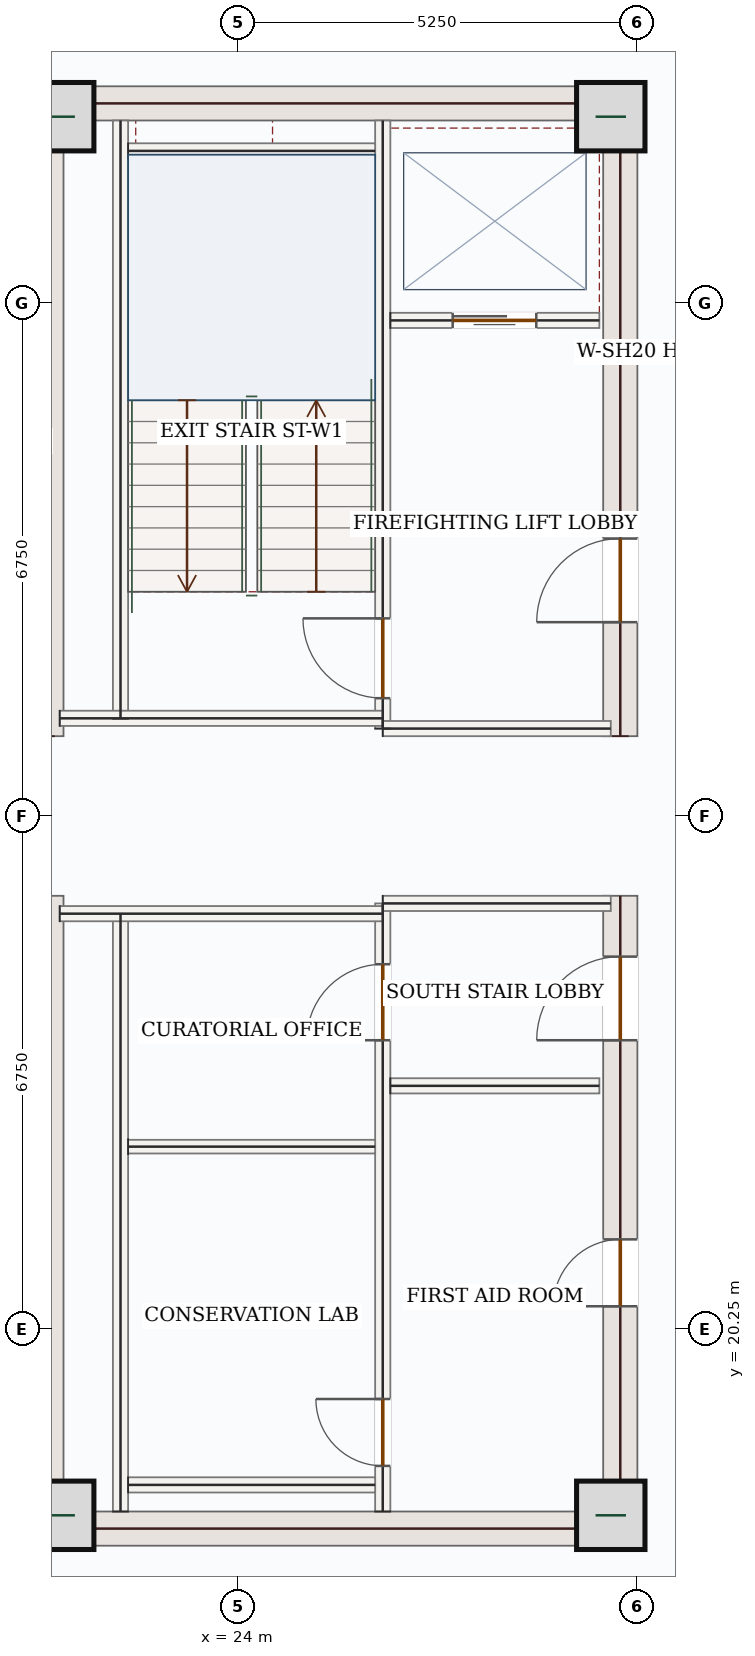
"""IFC4 building model, lengths in metres.
Left out: names, types, materials, properties, quantities, classifications, styles, units other than length and angle.
Written with IfcOpenShell. Run it as: python <this file> out.ifc"""

import sys

from ifc_helpers import new_model, si_unit, direction, frame, frame_2d, origin, origin_2d, place, context, subcontext, project, spatial, rectangle, extrude, source, transform, mapped, element, fill, save


model = new_model("IFC4")
c1 = context("Model", 3, precision=1e-05, world=origin(), true_north=direction((0.0, 1.0)))
c2 = subcontext(c1, "Body", "Model", "MODEL_VIEW")
j1 = project(units=[si_unit("LENGTHUNIT", "METRE"), si_unit("PLANEANGLEUNIT", "RADIAN")], contexts=[c1])
p1 = place(None, origin())
s1 = spatial("IfcSite", under=j1, at=p1, CompositionType="ELEMENT")
p2 = place(p1, origin())
s2 = spatial("IfcBuilding", under=s1, at=p2, CompositionType="ELEMENT")
p3 = place(p2, frame((0.0, 0.0, 357.3)))
s3 = spatial("IfcBuildingStorey", under=s2, at=p3, CompositionType="ELEMENT", Elevation=357.3)
m1 = source(origin(), c2, "Body", "SweptSolid", [
    extrude(rectangle(XDim=8.55, YDim=0.45, at=frame_2d((4.275, 0.0))), origin(), (0.0, 0.0, 1.0), 3.45),
])
for number, where, z_axis, x_axis in (
    (1, (21.475, 17.4, 0.0), (0.0, 0.0, 1.0), (0.0, 1.0, 0.0)),
    (2, (21.475, 28.05, 0.0), (0.0, 0.0, 1.0), (0.0, 1.0, 0.0)),
):
    element("IfcWall", number, at=place(p3, frame(where, z_axis=z_axis, x_axis=x_axis)), inside=s3, PredefinedType="SHEAR", context=c2, shape_type="MappedRepresentation", body=[
        mapped(m1, transform((0.0, 0.0, 0.0), x_axis=(1.0, 0.0, 0.0), y_axis=(0.0, 1.0, 0.0), z_axis=(0.0, 0.0, 1.0), scale=1.0)),
    ])
p4 = place(p3, frame((29.025, 17.4, 0.0), z_axis=(0.0, 0.0, 1.0), x_axis=(0.0, 1.0, 0.0)))
e3 = element("IfcWall", 3, at=p4, inside=s3, PredefinedType="SHEAR", context=c2, shape_type="SweptSolid", body=[
    extrude(rectangle(XDim=8.55, YDim=0.45, at=frame_2d((4.275, 0.0))), origin(), (0.0, 0.0, 1.0), 3.45),
])
p5 = place(p4, frame((6.65, 0.0, 0.0)))
e4 = element("IfcOpeningElement", 4, at=p5, cuts=e3, PredefinedType="OPENING", context=c2, shape_type="SweptSolid", body=[
    extrude(rectangle(XDim=1.1, YDim=2.2, at=frame_2d((0.55, 1.1))), frame((0.0, 0.235, 0.0), z_axis=(0.0, -1.0, 0.0), x_axis=(1.0, 0.0, 0.0)), (0.0, 0.0, 1.0), 0.47),
])
p6 = place(p4, frame((3.15, 0.0, 0.0)))
e5 = element("IfcOpeningElement", 5, at=p6, cuts=e3, PredefinedType="OPENING", context=c2, shape_type="SweptSolid", body=[
    extrude(rectangle(XDim=0.88, YDim=2.1, at=frame_2d((0.44, 1.05))), frame((0.0, 0.235, 0.0), z_axis=(0.0, -1.0, 0.0), x_axis=(1.0, 0.0, 0.0)), (0.0, 0.0, 1.0), 0.47),
])
p7 = place(p3, frame((29.025, 28.05, 0.0), z_axis=(0.0, 0.0, 1.0), x_axis=(0.0, 1.0, 0.0)))
e6 = element("IfcWall", 6, at=p7, inside=s3, PredefinedType="SHEAR", context=c2, shape_type="SweptSolid", body=[
    extrude(rectangle(XDim=8.55, YDim=0.45, at=frame_2d((4.275, 0.0))), origin(), (0.0, 0.0, 1.0), 3.45),
])
p8 = place(p7, frame((1.5, 0.0, 0.0)))
e7 = element("IfcOpeningElement", 7, at=p8, cuts=e6, PredefinedType="OPENING", context=c2, shape_type="SweptSolid", body=[
    extrude(rectangle(XDim=1.1, YDim=2.2, at=frame_2d((0.55, 1.1))), frame((0.0, 0.235, 0.0), z_axis=(0.0, -1.0, 0.0), x_axis=(1.0, 0.0, 0.0)), (0.0, 0.0, 1.0), 0.47),
])
m2 = source(origin(), c2, "Body", "SweptSolid", [
    extrude(rectangle(XDim=7.1, YDim=0.45, at=frame_2d((3.55, 0.0))), origin(), (0.0, 0.0, 1.0), 3.45),
])
for number, where, z_axis, x_axis in (
    (8, (21.7, 17.625, 0.0), (0.0, 0.0, 1.0), (1.0, 0.0, 0.0)),
    (9, (21.7, 36.375, 0.0), (0.0, 0.0, 1.0), (1.0, 0.0, 0.0)),
):
    element("IfcWall", number, at=place(p3, frame(where, z_axis=z_axis, x_axis=x_axis)), inside=s3, PredefinedType="SHEAR", context=c2, shape_type="MappedRepresentation", body=[
        mapped(m2, transform((0.0, 0.0, 0.0), x_axis=(1.0, 0.0, 0.0), y_axis=(0.0, 1.0, 0.0), z_axis=(0.0, 0.0, 1.0), scale=1.0)),
    ])
m3 = source(origin(), c2, "Body", "SweptSolid", [
    extrude(rectangle(XDim=0.9, YDim=0.9, at=origin_2d()), origin(), (0.0, 0.0, 1.0), 3.75),
])
for number, where, z_axis, x_axis in (
    (10, (21.65, 17.8, 0.0), (0.0, 0.0, 1.0), (1.0, 0.0, 0.0)),
    (11, (28.9, 17.8, 0.0), (0.0, 0.0, 1.0), (1.0, 0.0, 0.0)),
    (12, (21.65, 36.2, 0.0), (0.0, 0.0, 1.0), (1.0, 0.0, 0.0)),
    (13, (28.9, 36.2, 0.0), (0.0, 0.0, 1.0), (1.0, 0.0, 0.0)),
):
    element("IfcColumn", number, at=place(p3, frame(where, z_axis=z_axis, x_axis=x_axis)), inside=s3, PredefinedType="COLUMN", context=c2, shape_type="MappedRepresentation", body=[
        mapped(m3, transform((0.0, 0.0, 0.0), x_axis=(1.0, 0.0, 0.0), y_axis=(0.0, 1.0, 0.0), z_axis=(0.0, 0.0, 1.0), scale=1.0)),
    ])
p9 = place(p3, frame((23.005, 14.093, 0.0), z_axis=(0.0, 0.0, 1.0), x_axis=(-0.681486568047, 0.731830620821, 0.0)))
e14 = element("IfcWall", 14, at=p9, inside=s3, PredefinedType="SOLIDWALL", context=c2, shape_type="SweptSolid", body=[
    extrude(rectangle(XDim=5.965, YDim=0.28, at=frame_2d((2.982, 0.0))), origin(), (0.0, 0.0, 1.0), 3.45),
])
p10 = place(p9, frame((2.232, 0.0, 0.85)))
e15 = element("IfcOpeningElement", 15, at=p10, cuts=e14, PredefinedType="OPENING", context=c2, shape_type="SweptSolid", body=[
    extrude(rectangle(XDim=1.5, YDim=1.5, at=frame_2d((0.75, 0.75))), frame((0.0, 0.15, 0.0), z_axis=(0.0, -1.0, 0.0), x_axis=(1.0, 0.0, 0.0)), (0.0, 0.0, 1.0), 0.3),
])
m4 = source(origin(), c2, "Body", "SweptSolid", [
    extrude(rectangle(XDim=7.87, YDim=0.2, at=frame_2d((3.935, 0.0))), origin(), (0.0, 0.0, 1.0), 3.45),
])
for number, where, z_axis, x_axis in (
    (16, (22.45, 17.85, 0.0), (0.0, 0.0, 1.0), (0.0, 1.0, 0.0)),
    (17, (22.45, 28.28, 0.0), (0.0, 0.0, 1.0), (0.0, 1.0, 0.0)),
):
    element("IfcWall", number, at=place(p3, frame(where, z_axis=z_axis, x_axis=x_axis)), inside=s3, PredefinedType="SOLIDWALL", context=c2, shape_type="MappedRepresentation", body=[
        mapped(m4, transform((0.0, 0.0, 0.0), x_axis=(1.0, 0.0, 0.0), y_axis=(0.0, 1.0, 0.0), z_axis=(0.0, 0.0, 1.0), scale=1.0)),
    ])
p11 = place(p3, frame((25.9, 17.85, 0.0), z_axis=(0.0, 0.0, 1.0), x_axis=(0.0, 1.0, 0.0)))
e18 = element("IfcWall", 18, at=p11, inside=s3, PredefinedType="SOLIDWALL", context=c2, shape_type="SweptSolid", body=[
    extrude(rectangle(XDim=8.0, YDim=0.2, at=frame_2d((4.0, 0.0))), origin(), (0.0, 0.0, 1.0), 3.45),
])
p12 = place(p11, frame((6.2, 0.0, 0.0)))
e19 = element("IfcOpeningElement", 19, at=p12, cuts=e18, PredefinedType="OPENING", context=c2, shape_type="SweptSolid", body=[
    extrude(rectangle(XDim=1.0, YDim=2.15, at=frame_2d((0.5, 1.075))), frame((0.0, 0.11, 0.0), z_axis=(0.0, -1.0, 0.0), x_axis=(1.0, 0.0, 0.0)), (0.0, 0.0, 1.0), 0.22),
])
p13 = place(p11, frame((0.6, 0.0, 0.0)))
e20 = element("IfcOpeningElement", 20, at=p13, cuts=e18, PredefinedType="OPENING", context=c2, shape_type="SweptSolid", body=[
    extrude(rectangle(XDim=0.88, YDim=2.1, at=frame_2d((0.44, 1.05))), frame((0.0, 0.11, 0.0), z_axis=(0.0, -1.0, 0.0), x_axis=(1.0, 0.0, 0.0)), (0.0, 0.0, 1.0), 0.22),
])
p14 = place(p3, frame((25.9, 28.15, 0.0), z_axis=(0.0, 0.0, 1.0), x_axis=(0.0, 1.0, 0.0)))
e21 = element("IfcWall", 21, at=p14, inside=s3, PredefinedType="SOLIDWALL", context=c2, shape_type="SweptSolid", body=[
    extrude(rectangle(XDim=8.0, YDim=0.2, at=frame_2d((4.0, 0.0))), origin(), (0.0, 0.0, 1.0), 3.45),
])
p15 = place(p14, frame((0.4, 0.0, 0.0)))
e22 = element("IfcOpeningElement", 22, at=p15, cuts=e21, PredefinedType="OPENING", context=c2, shape_type="SweptSolid", body=[
    extrude(rectangle(XDim=1.05, YDim=2.15, at=frame_2d((0.525, 1.075))), frame((0.0, 0.11, 0.0), z_axis=(0.0, -1.0, 0.0), x_axis=(1.0, 0.0, 0.0)), (0.0, 0.0, 1.0), 0.22),
])
m5 = source(origin(), c2, "Body", "SweptSolid", [
    extrude(rectangle(XDim=4.25, YDim=0.2, at=frame_2d((2.125, 0.0))), origin(), (0.0, 0.0, 1.0), 3.45),
])
p16 = place(p3, frame((21.65, 25.715, 0.0), z_axis=(0.0, 0.0, 1.0), x_axis=(1.0, 0.0, 0.0)))
e23 = element("IfcWall", 23, at=p16, inside=s3, PredefinedType="SOLIDWALL", context=c2, shape_type="MappedRepresentation", body=[
    mapped(m5, transform((0.0, 0.0, 0.0), x_axis=(1.0, 0.0, 0.0), y_axis=(0.0, 1.0, 0.0), z_axis=(0.0, 0.0, 1.0), scale=1.0)),
])
m6 = source(origin(), c2, "Body", "SweptSolid", [
    extrude(rectangle(XDim=3.0, YDim=0.2, at=frame_2d((1.5, 0.0))), origin(), (0.0, 0.0, 1.0), 3.45),
])
p17 = place(p3, frame((25.9, 25.85, 0.0), z_axis=(0.0, 0.0, 1.0), x_axis=(1.0, 0.0, 0.0)))
e24 = element("IfcWall", 24, at=p17, inside=s3, PredefinedType="SOLIDWALL", context=c2, shape_type="MappedRepresentation", body=[
    mapped(m6, transform((0.0, 0.0, 0.0), x_axis=(1.0, 0.0, 0.0), y_axis=(0.0, 1.0, 0.0), z_axis=(0.0, 0.0, 1.0), scale=1.0)),
])
p18 = place(p3, frame((21.65, 28.285, 0.0), z_axis=(0.0, 0.0, 1.0), x_axis=(1.0, 0.0, 0.0)))
e25 = element("IfcWall", 25, at=p18, inside=s3, PredefinedType="SOLIDWALL", context=c2, shape_type="MappedRepresentation", body=[
    mapped(m5, transform((0.0, 0.0, 0.0), x_axis=(1.0, 0.0, 0.0), y_axis=(0.0, 1.0, 0.0), z_axis=(0.0, 0.0, 1.0), scale=1.0)),
])
p19 = place(p3, frame((25.9, 28.15, 0.0), z_axis=(0.0, 0.0, 1.0), x_axis=(1.0, 0.0, 0.0)))
e26 = element("IfcWall", 26, at=p19, inside=s3, PredefinedType="SOLIDWALL", context=c2, shape_type="MappedRepresentation", body=[
    mapped(m6, transform((0.0, 0.0, 0.0), x_axis=(1.0, 0.0, 0.0), y_axis=(0.0, 1.0, 0.0), z_axis=(0.0, 0.0, 1.0), scale=1.0)),
])
m7 = source(origin(), c2, "Body", "SweptSolid", [
    extrude(rectangle(XDim=3.25, YDim=0.2, at=frame_2d((1.625, 0.0))), origin(), (0.0, 0.0, 1.0), 3.45),
])
for number, where, z_axis, x_axis in (
    (27, (22.55, 35.75, 0.0), (0.0, 0.0, 1.0), (1.0, 0.0, 0.0)),
    (28, (22.55, 18.2, 0.0), (0.0, 0.0, 1.0), (1.0, 0.0, 0.0)),
):
    element("IfcWall", number, at=place(p3, frame(where, z_axis=z_axis, x_axis=x_axis)), inside=s3, PredefinedType="SOLIDWALL", context=c2, shape_type="MappedRepresentation", body=[
        mapped(m7, transform((0.0, 0.0, 0.0), x_axis=(1.0, 0.0, 0.0), y_axis=(0.0, 1.0, 0.0), z_axis=(0.0, 0.0, 1.0), scale=1.0)),
    ])
m8 = source(origin(), c2, "Body", "SweptSolid", [
    extrude(rectangle(XDim=3.25, YDim=0.18, at=frame_2d((1.625, 0.0))), origin(), (0.0, 0.0, 1.0), 3.45),
])
p20 = place(p3, frame((22.55, 22.65, 0.0), z_axis=(0.0, 0.0, 1.0), x_axis=(1.0, 0.0, 0.0)))
e29 = element("IfcWall", 29, at=p20, inside=s3, PredefinedType="PARTITIONING", context=c2, shape_type="MappedRepresentation", body=[
    mapped(m8, transform((0.0, 0.0, 0.0), x_axis=(1.0, 0.0, 0.0), y_axis=(0.0, 1.0, 0.0), z_axis=(0.0, 0.0, 1.0), scale=1.0)),
])
p21 = place(p3, frame((26.0, 33.52, 0.0), z_axis=(0.0, 0.0, 1.0), x_axis=(1.0, 0.0, 0.0)))
e30 = element("IfcWall", 30, at=p21, inside=s3, PredefinedType="SOLIDWALL", context=c2, shape_type="SweptSolid", body=[
    extrude(rectangle(XDim=2.75, YDim=0.2, at=frame_2d((1.375, 0.0))), origin(), (0.0, 0.0, 1.0), 3.45),
])
p22 = place(p21, frame((0.82, 0.0, 0.0)))
e31 = element("IfcOpeningElement", 31, at=p22, cuts=e30, PredefinedType="OPENING", context=c2, shape_type="SweptSolid", body=[
    extrude(rectangle(XDim=1.1, YDim=2.15, at=frame_2d((0.55, 1.075))), frame((0.0, 0.11, 0.0), z_axis=(0.0, -1.0, 0.0), x_axis=(1.0, 0.0, 0.0)), (0.0, 0.0, 1.0), 0.22),
])
m9 = source(origin(), c2, "Body", "SweptSolid", [
    extrude(rectangle(XDim=2.75, YDim=0.2, at=frame_2d((1.375, 0.0))), origin(), (0.0, 0.0, 1.0), 3.45),
])
p23 = place(p3, frame((26.0, 23.45, 0.0), z_axis=(0.0, 0.0, 1.0), x_axis=(1.0, 0.0, 0.0)))
e32 = element("IfcWall", 32, at=p23, inside=s3, PredefinedType="SOLIDWALL", context=c2, shape_type="MappedRepresentation", body=[
    mapped(m9, transform((0.0, 0.0, 0.0), x_axis=(1.0, 0.0, 0.0), y_axis=(0.0, 1.0, 0.0), z_axis=(0.0, 0.0, 1.0), scale=1.0)),
])
m10 = source(origin(), c2, "Body", "SweptSolid", [
    extrude(rectangle(XDim=1.05, YDim=2.15, at=frame_2d((0.525, 1.075))), frame((0.0, 0.025, 0.0), z_axis=(0.0, -1.0, 0.0), x_axis=(1.0, 0.0, 0.0)), (0.0, 0.0, 1.0), 0.05),
])
p24 = place(p15, origin())
e33 = element("IfcDoor", 33, at=p24, inside=s3, OperationType="SINGLE_SWING_RIGHT", PredefinedType="DOOR", context=c2, shape_type="MappedRepresentation", body=[
    mapped(m10, transform((0.0, 0.0, 0.0), x_axis=(1.0, 0.0, 0.0), y_axis=(0.0, 1.0, 0.0), z_axis=(0.0, 0.0, 1.0), scale=1.0)),
])
fill(e22, e33)
m11 = source(origin(), c2, "Body", "SweptSolid", [
    extrude(rectangle(XDim=1.0, YDim=2.15, at=frame_2d((0.5, 1.075))), frame((0.0, 0.025, 0.0), z_axis=(0.0, -1.0, 0.0), x_axis=(1.0, 0.0, 0.0)), (0.0, 0.0, 1.0), 0.05),
])
p25 = place(p12, origin())
e34 = element("IfcDoor", 34, at=p25, inside=s3, OperationType="SINGLE_SWING_LEFT", PredefinedType="DOOR", context=c2, shape_type="MappedRepresentation", body=[
    mapped(m11, transform((0.0, 0.0, 0.0), x_axis=(1.0, 0.0, 0.0), y_axis=(0.0, 1.0, 0.0), z_axis=(0.0, 0.0, 1.0), scale=1.0)),
])
fill(e19, e34)
m12 = source(origin(), c2, "Body", "SweptSolid", [
    extrude(rectangle(XDim=0.88, YDim=2.1, at=frame_2d((0.44, 1.05))), frame((0.0, 0.025, 0.0), z_axis=(0.0, -1.0, 0.0), x_axis=(1.0, 0.0, 0.0)), (0.0, 0.0, 1.0), 0.05),
])
p26 = place(p13, origin())
e35 = element("IfcDoor", 35, at=p26, inside=s3, OperationType="SINGLE_SWING_RIGHT", PredefinedType="DOOR", context=c2, shape_type="MappedRepresentation", body=[
    mapped(m12, transform((0.0, 0.0, 0.0), x_axis=(1.0, 0.0, 0.0), y_axis=(0.0, 1.0, 0.0), z_axis=(0.0, 0.0, 1.0), scale=1.0)),
])
fill(e20, e35)
m13 = source(origin(), c2, "Body", "SweptSolid", [
    extrude(rectangle(XDim=1.1, YDim=2.15, at=frame_2d((0.55, 1.075))), frame((0.0, 0.025, 0.0), z_axis=(0.0, -1.0, 0.0), x_axis=(1.0, 0.0, 0.0)), (0.0, 0.0, 1.0), 0.05),
])
p27 = place(p22, origin())
e36 = element("IfcDoor", 36, at=p27, inside=s3, OperationType="DOUBLE_DOOR_SLIDING", PredefinedType="DOOR", context=c2, shape_type="MappedRepresentation", body=[
    mapped(m13, transform((0.0, 0.0, 0.0), x_axis=(1.0, 0.0, 0.0), y_axis=(0.0, 1.0, 0.0), z_axis=(0.0, 0.0, 1.0), scale=1.0)),
])
fill(e31, e36)
m14 = source(origin(), c2, "Body", "SweptSolid", [
    extrude(rectangle(XDim=1.1, YDim=2.2, at=frame_2d((0.55, 1.1))), frame((0.0, 0.025, 0.0), z_axis=(0.0, -1.0, 0.0), x_axis=(1.0, 0.0, 0.0)), (0.0, 0.0, 1.0), 0.05),
])
p28 = place(p8, origin())
e37 = element("IfcDoor", 37, at=p28, inside=s3, OperationType="SINGLE_SWING_LEFT", PredefinedType="DOOR", context=c2, shape_type="MappedRepresentation", body=[
    mapped(m14, transform((0.0, 0.0, 0.0), x_axis=(1.0, 0.0, 0.0), y_axis=(0.0, 1.0, 0.0), z_axis=(0.0, 0.0, 1.0), scale=1.0)),
])
fill(e7, e37)
p29 = place(p5, origin())
e38 = element("IfcDoor", 38, at=p29, inside=s3, OperationType="SINGLE_SWING_LEFT", PredefinedType="DOOR", context=c2, shape_type="MappedRepresentation", body=[
    mapped(m14, transform((0.0, 0.0, 0.0), x_axis=(1.0, 0.0, 0.0), y_axis=(0.0, 1.0, 0.0), z_axis=(0.0, 0.0, 1.0), scale=1.0)),
])
fill(e4, e38)
p30 = place(p6, origin())
e39 = element("IfcDoor", 39, at=p30, inside=s3, OperationType="SINGLE_SWING_LEFT", PredefinedType="DOOR", context=c2, shape_type="MappedRepresentation", body=[
    mapped(m12, transform((0.0, 0.0, 0.0), x_axis=(1.0, 0.0, 0.0), y_axis=(0.0, 1.0, 0.0), z_axis=(0.0, 0.0, 1.0), scale=1.0)),
])
fill(e5, e39)
save(model, sys.argv[1])
